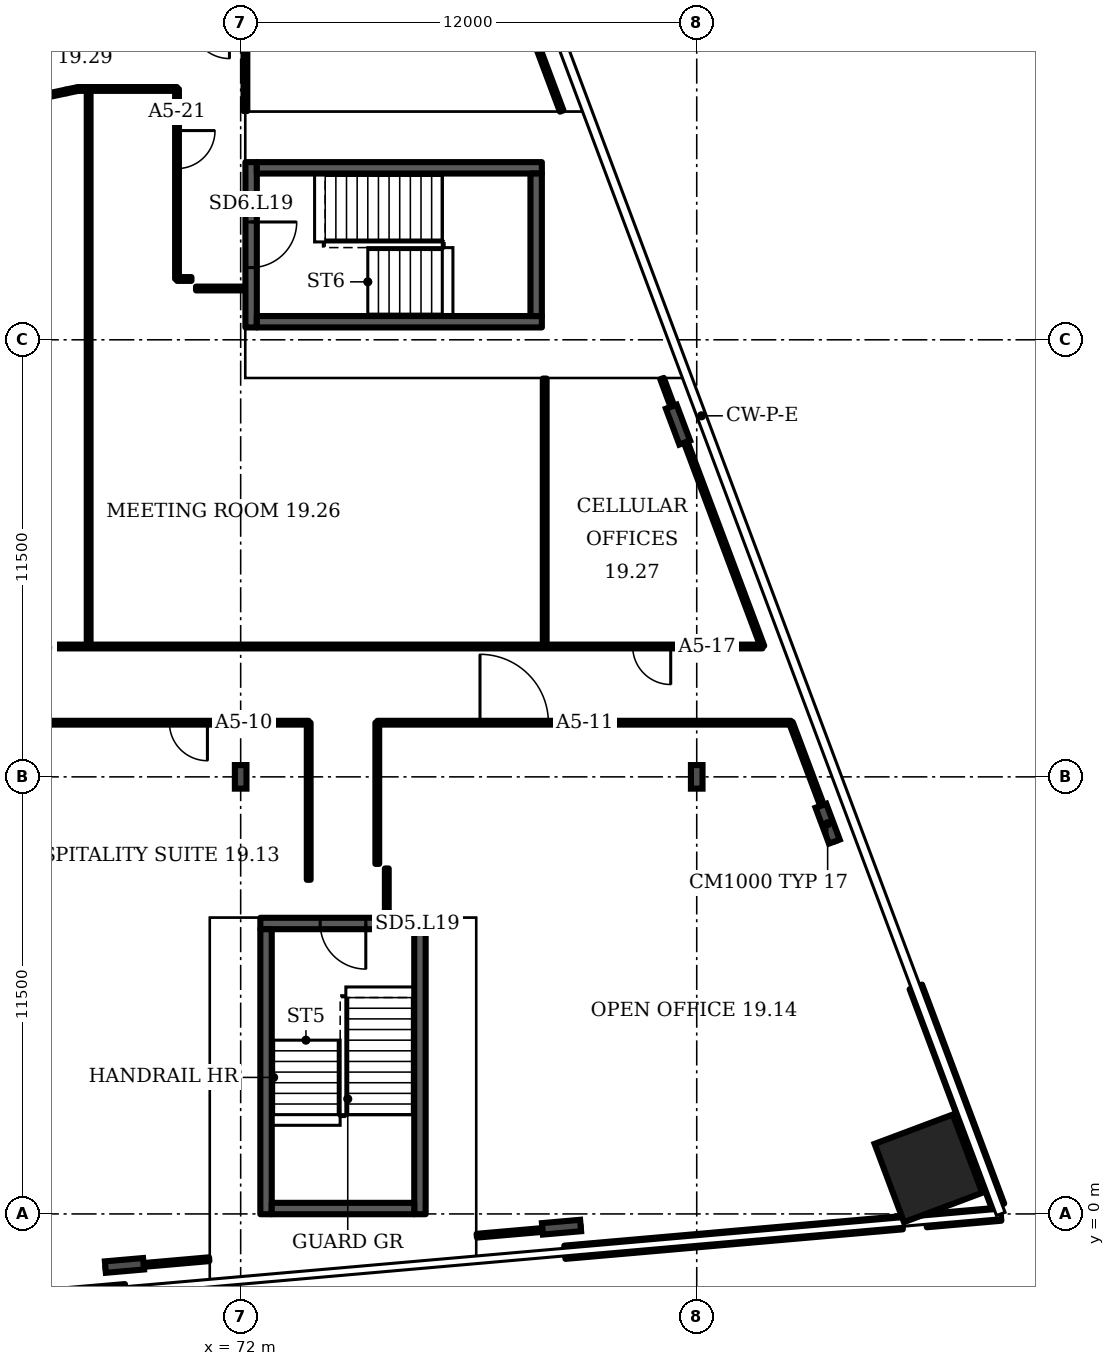
"""IFC4 building model, lengths in metres.
Left out: names, types, materials, properties, quantities, classifications, styles, units other than length and angle.
Written with IfcOpenShell. Run it as: python <this file> out.ifc"""

import sys

from ifc_helpers import new_model, si_unit, direction, frame, frame_2d, origin, origin_2d, place, context, subcontext, project, spatial, rectangle, i_section, extrude, element, fill, save


model = new_model("IFC4")
c1 = context("Model", 3, precision=1e-05, world=origin(), true_north=direction((0.0, 1.0)))
c2 = subcontext(c1, "Body", "Model", "MODEL_VIEW")
j1 = project(units=[si_unit("LENGTHUNIT", "METRE"), si_unit("PLANEANGLEUNIT", "RADIAN")], contexts=[c1])
p1 = place(None, origin())
s1 = spatial("IfcSite", under=j1, at=p1, CompositionType="ELEMENT")
p2 = place(p1, origin())
s2 = spatial("IfcBuilding", under=s1, at=p2, CompositionType="ELEMENT")
p3 = place(p2, frame((0.0, 0.0, 88.3)))
s3 = spatial("IfcBuildingStorey", under=s2, at=p3, CompositionType="ELEMENT", Elevation=88.3)
p4 = place(p3, frame((90.096, 1.2, 0.0), z_axis=(0.0, 0.0, 1.0), x_axis=(-0.351123, 0.936328, 0.0)))
e1 = element("IfcColumn", 1, at=p4, inside=s3, PredefinedType="COLUMN", context=c2, shape_type="SweptSolid", body=[
    extrude(rectangle(XDim=2.2, YDim=2.2, at=origin_2d()), origin(), (0.0, 0.0, 1.0), 3.6),
])
for number, where, z_axis, x_axis in (
    (2, (68.942, -1.355, 0.0), (0.0, 0.0, 1.0), (0.087, -0.996, 0.0)),
    (3, (80.442, -0.349, 0.0), (0.0, 0.0, 1.0), (0.087, -0.996, 0.0)),
    (4, (87.445, 10.268, 0.0), (0.0, 0.0, 1.0), (0.936, 0.351, 0.0)),
    (5, (83.507, 20.768, 0.0), (0.0, 0.0, 1.0), (0.936, 0.351, 0.0)),
):
    element("IfcColumn", number, at=place(p3, frame(where, z_axis=z_axis, x_axis=x_axis)), inside=s3, PredefinedType="COLUMN", context=c2, shape_type="SweptSolid", body=[
        extrude(i_section(OverallWidth=0.302, OverallDepth=1.008, WebThickness=0.021, FlangeThickness=0.04, FilletRadius=0.03, at=origin_2d()), origin(), (0.0, 0.0, 1.0), 3.6),
    ])
for number, where, z_axis, x_axis in (
    (6, (72.0, 11.5, 0.0), (0.0, 0.0, 1.0), (1.0, 0.0, 0.0)),
    (7, (84.0, 11.5, 0.0), (0.0, 0.0, 1.0), (1.0, 0.0, 0.0)),
):
    element("IfcColumn", number, at=place(p3, frame(where, z_axis=z_axis, x_axis=x_axis)), inside=s3, PredefinedType="COLUMN", context=c2, shape_type="SweptSolid", body=[
        extrude(i_section(OverallWidth=0.305, OverallDepth=0.62, WebThickness=0.021, FlangeThickness=0.04, FilletRadius=0.027, at=origin_2d()), origin(), (0.0, 0.0, 1.0), 3.6),
    ])
p5 = place(p3, frame((46.045, -4.026, 0.0), z_axis=(0.0, 0.0, 1.0), x_axis=(0.99619, 0.087163, 0.0)))
e8 = element("IfcWall", 8, at=p5, inside=s3, PredefinedType="SOLIDWALL", context=c2, shape_type="SweptSolid", body=[
    extrude(rectangle(XDim=23.013, YDim=0.35, at=frame_2d((11.506, 0.0))), origin(), (0.0, 0.0, 1.0), 1.0),
])
p6 = place(p3, frame((80.53, -1.009, 0.0), z_axis=(0.0, 0.0, 1.0), x_axis=(0.996198, 0.087169, 0.0)))
e9 = element("IfcWall", 9, at=p6, inside=s3, PredefinedType="SOLIDWALL", context=c2, shape_type="SweptSolid", body=[
    extrude(rectangle(XDim=8.912, YDim=0.35, at=frame_2d((4.456, 0.0))), origin(), (0.0, 0.0, 1.0), 1.0),
])
p7 = place(p3, frame((90.039, -0.177, 0.0), z_axis=(0.0, 0.0, 1.0), x_axis=(0.996193, 0.08717, 0.0)))
e10 = element("IfcWall", 10, at=p7, inside=s3, PredefinedType="SOLIDWALL", context=c2, shape_type="SweptSolid", body=[
    extrude(rectangle(XDim=1.969, YDim=0.35, at=frame_2d((0.984, 0.0))), origin(), (0.0, 0.0, 1.0), 1.0),
])
p8 = place(p3, frame((91.926, 0.211, 0.0), z_axis=(0.0, 0.0, 1.0), x_axis=(-0.351118, 0.936328, 0.0)))
e11 = element("IfcWall", 11, at=p8, inside=s3, PredefinedType="SOLIDWALL", context=c2, shape_type="SweptSolid", body=[
    extrude(rectangle(XDim=6.154, YDim=0.35, at=frame_2d((3.077, 0.0))), origin(), (0.0, 0.0, 1.0), 1.0),
])
p9 = place(p3, frame((72.518, 7.642, 0.0), z_axis=(0.0, 0.0, 1.0), x_axis=(1.0, 0.0, 0.0)))
e12 = element("IfcWall", 12, at=p9, inside=s3, PredefinedType="SHEAR", context=c2, shape_type="SweptSolid", body=[
    extrude(rectangle(XDim=4.35, YDim=0.3, at=frame_2d((2.175, 0.0))), origin(), (0.0, 0.0, 1.0), 3.15),
])
p10 = place(p9, frame((1.575, 0.0, 0.0)))
e13 = element("IfcOpeningElement", 13, at=p10, cuts=e12, PredefinedType="OPENING", context=c2, shape_type="SweptSolid", body=[
    extrude(rectangle(XDim=1.2, YDim=2.1, at=frame_2d((0.6, 1.05))), frame((0.0, 0.16, 0.0), z_axis=(0.0, -1.0, 0.0), x_axis=(1.0, 0.0, 0.0)), (0.0, 0.0, 1.0), 0.32),
])
p11 = place(p3, frame((72.275, 23.325, 0.0), z_axis=(0.0, 0.0, 1.0), x_axis=(0.0, 1.0, 0.0)))
e14 = element("IfcWall", 14, at=p11, inside=s3, PredefinedType="SHEAR", context=c2, shape_type="SweptSolid", body=[
    extrude(rectangle(XDim=4.35, YDim=0.3, at=frame_2d((2.175, 0.0))), origin(), (0.0, 0.0, 1.0), 3.15),
])
p12 = place(p11, frame((1.575, 0.0, 0.0)))
e15 = element("IfcOpeningElement", 15, at=p12, cuts=e14, PredefinedType="OPENING", context=c2, shape_type="SweptSolid", body=[
    extrude(rectangle(XDim=1.2, YDim=2.1, at=frame_2d((0.6, 1.05))), frame((0.0, 0.16, 0.0), z_axis=(0.0, -1.0, 0.0), x_axis=(1.0, 0.0, 0.0)), (0.0, 0.0, 1.0), 0.32),
])
p13 = place(p3, frame((45.3, 12.925, 0.0), z_axis=(0.0, 0.0, 1.0), x_axis=(1.0, 0.0, 0.0)))
e16 = element("IfcWall", 16, at=p13, inside=s3, PredefinedType="PARTITIONING", context=c2, shape_type="SweptSolid", body=[
    extrude(rectangle(XDim=28.49, YDim=0.1, at=frame_2d((14.245, 0.0))), origin(), (0.0, 0.0, 1.0), 3.15),
])
p14 = place(p13, frame((5.525, 0.0, 0.0)))
e17 = element("IfcOpeningElement", 17, at=p14, cuts=e16, PredefinedType="OPENING", context=c2, shape_type="SweptSolid", body=[
    extrude(rectangle(XDim=1.8, YDim=2.1, at=frame_2d((0.9, 1.05))), frame((0.0, 0.06, 0.0), z_axis=(0.0, -1.0, 0.0), x_axis=(1.0, 0.0, 0.0)), (0.0, 0.0, 1.0), 0.12),
])
p15 = place(p13, frame((12.825, 0.0, 0.0)))
e18 = element("IfcOpeningElement", 18, at=p15, cuts=e16, PredefinedType="OPENING", context=c2, shape_type="SweptSolid", body=[
    extrude(rectangle(XDim=1.0, YDim=2.1, at=frame_2d((0.5, 1.05))), frame((0.0, 0.06, 0.0), z_axis=(0.0, -1.0, 0.0), x_axis=(1.0, 0.0, 0.0)), (0.0, 0.0, 1.0), 0.12),
])
p16 = place(p13, frame((17.625, 0.0, 0.0)))
e19 = element("IfcOpeningElement", 19, at=p16, cuts=e16, PredefinedType="OPENING", context=c2, shape_type="SweptSolid", body=[
    extrude(rectangle(XDim=1.0, YDim=2.1, at=frame_2d((0.5, 1.05))), frame((0.0, 0.06, 0.0), z_axis=(0.0, -1.0, 0.0), x_axis=(1.0, 0.0, 0.0)), (0.0, 0.0, 1.0), 0.12),
])
p17 = place(p13, frame((24.825, 0.0, 0.0)))
e20 = element("IfcOpeningElement", 20, at=p17, cuts=e16, PredefinedType="OPENING", context=c2, shape_type="SweptSolid", body=[
    extrude(rectangle(XDim=1.0, YDim=2.1, at=frame_2d((0.5, 1.05))), frame((0.0, 0.06, 0.0), z_axis=(0.0, -1.0, 0.0), x_axis=(1.0, 0.0, 0.0)), (0.0, 0.0, 1.0), 0.12),
])
p18 = place(p3, frame((45.3, 14.93, 0.0), z_axis=(0.0, 0.0, 1.0), x_axis=(1.0, 0.0, 0.0)))
e21 = element("IfcWall", 21, at=p18, inside=s3, PredefinedType="PARTITIONING", context=c2, shape_type="SweptSolid", body=[
    extrude(rectangle(XDim=40.43, YDim=0.1, at=frame_2d((20.215, 0.0))), origin(), (0.0, 0.0, 1.0), 3.15),
])
p19 = place(p18, frame((12.665, 0.0, 0.0)))
e22 = element("IfcOpeningElement", 22, at=p19, cuts=e21, PredefinedType="OPENING", context=c2, shape_type="SweptSolid", body=[
    extrude(rectangle(XDim=1.0, YDim=2.1, at=frame_2d((0.5, 1.05))), frame((0.0, 0.06, 0.0), z_axis=(0.0, -1.0, 0.0), x_axis=(1.0, 0.0, 0.0)), (0.0, 0.0, 1.0), 0.12),
])
p20 = place(p18, frame((19.08, 0.0, 0.0)))
e23 = element("IfcOpeningElement", 23, at=p20, cuts=e21, PredefinedType="OPENING", context=c2, shape_type="SweptSolid", body=[
    extrude(rectangle(XDim=1.0, YDim=2.1, at=frame_2d((0.5, 1.05))), frame((0.0, 0.06, 0.0), z_axis=(0.0, -1.0, 0.0), x_axis=(1.0, 0.0, 0.0)), (0.0, 0.0, 1.0), 0.12),
])
p21 = place(p18, frame((37.015, 0.0, 0.0)))
e24 = element("IfcOpeningElement", 24, at=p21, cuts=e21, PredefinedType="OPENING", context=c2, shape_type="SweptSolid", body=[
    extrude(rectangle(XDim=1.0, YDim=2.1, at=frame_2d((0.5, 1.05))), frame((0.0, 0.06, 0.0), z_axis=(0.0, -1.0, 0.0), x_axis=(1.0, 0.0, 0.0)), (0.0, 0.0, 1.0), 0.12),
])
p22 = place(p3, frame((66.78, 29.4, 0.0), z_axis=(0.0, 0.0, 1.0), x_axis=(0.977792, 0.209581, 0.0)))
e25 = element("IfcWall", 25, at=p22, inside=s3, PredefinedType="PARTITIONING", context=c2, shape_type="SweptSolid", body=[
    extrude(rectangle(XDim=0.644, YDim=0.1, at=frame_2d((0.322, 0.0))), origin(), (0.0, 0.0, 1.0), 3.15),
])
p23 = place(p3, frame((67.41, 29.535, 0.0), z_axis=(0.0, 0.0, 1.0), x_axis=(0.978604, 0.205738, 0.0)))
e26 = element("IfcWall", 26, at=p23, inside=s3, PredefinedType="PARTITIONING", context=c2, shape_type="SweptSolid", body=[
    extrude(rectangle(XDim=0.317, YDim=0.1, at=frame_2d((0.158, 0.0))), origin(), (0.0, 0.0, 1.0), 3.15),
])
p24 = place(p3, frame((67.72, 29.6, 0.0), z_axis=(0.0, 0.0, 1.0), x_axis=(1.0, 0.0, 0.0)))
e27 = element("IfcWall", 27, at=p24, inside=s3, PredefinedType="PARTITIONING", context=c2, shape_type="SweptSolid", body=[
    extrude(rectangle(XDim=2.605, YDim=0.1, at=frame_2d((1.302, 0.0))), origin(), (0.0, 0.0, 1.0), 3.15),
])
p25 = place(p3, frame((68.0, 14.93, 0.0), z_axis=(0.0, 0.0, 1.0), x_axis=(0.0, 1.0, 0.0)))
e28 = element("IfcWall", 28, at=p25, inside=s3, PredefinedType="PARTITIONING", context=c2, shape_type="SweptSolid", body=[
    extrude(rectangle(XDim=14.67, YDim=0.1, at=frame_2d((7.335, 0.0))), origin(), (0.0, 0.0, 1.0), 3.15),
])
p26 = place(p3, frame((68.445, -1.43, 0.0), z_axis=(0.0, 0.0, 1.0), x_axis=(0.996195, 0.087118, 0.0)))
e29 = element("IfcWall", 29, at=p26, inside=s3, PredefinedType="PARTITIONING", context=c2, shape_type="SweptSolid", body=[
    extrude(rectangle(XDim=2.738, YDim=0.1, at=frame_2d((1.369, 0.0))), origin(), (0.0, 0.0, 1.0), 2.53),
])
p27 = place(p3, frame((70.325, 24.6, 0.0), z_axis=(0.0, 0.0, 1.0), x_axis=(0.0, 1.0, 0.0)))
e30 = element("IfcWall", 30, at=p27, inside=s3, PredefinedType="PARTITIONING", context=c2, shape_type="SweptSolid", body=[
    extrude(rectangle(XDim=5.0, YDim=0.1, at=frame_2d((2.5, 0.0))), origin(), (0.0, 0.0, 1.0), 3.15),
])
p28 = place(p27, frame((2.905, 0.0, 0.0)))
e31 = element("IfcOpeningElement", 31, at=p28, cuts=e30, PredefinedType="OPENING", context=c2, shape_type="SweptSolid", body=[
    extrude(rectangle(XDim=1.0, YDim=2.1, at=frame_2d((0.5, 1.05))), frame((0.0, 0.06, 0.0), z_axis=(0.0, -1.0, 0.0), x_axis=(1.0, 0.0, 0.0)), (0.0, 0.0, 1.0), 0.12),
])
p29 = place(p3, frame((70.325, 24.6, 0.0), z_axis=(0.0, 0.0, 1.0), x_axis=(1.0, 0.0, 0.0)))
e32 = element("IfcWall", 32, at=p29, inside=s3, PredefinedType="PARTITIONING", context=c2, shape_type="SweptSolid", body=[
    extrude(rectangle(XDim=0.38, YDim=0.1, at=frame_2d((0.19, 0.0))), origin(), (0.0, 0.0, 1.0), 3.15),
])
p30 = place(p3, frame((70.825, 24.35, 0.0), z_axis=(0.0, 0.0, 1.0), x_axis=(1.0, 0.0, 0.0)))
e33 = element("IfcWall", 33, at=p30, inside=s3, PredefinedType="PARTITIONING", context=c2, shape_type="SweptSolid", body=[
    extrude(rectangle(XDim=1.28, YDim=0.1, at=frame_2d((0.64, 0.0))), origin(), (0.0, 0.0, 1.0), 3.15),
])
p31 = place(p3, frame((72.125, 29.02, 0.0), z_axis=(0.0, 0.0, 1.0), x_axis=(0.0, 1.0, 0.0)))
e34 = element("IfcWall", 34, at=p31, inside=s3, PredefinedType="PARTITIONING", context=c2, shape_type="SweptSolid", body=[
    extrude(rectangle(XDim=2.38, YDim=0.1, at=frame_2d((1.19, 0.0))), origin(), (0.0, 0.0, 1.0), 3.15),
])
p32 = place(p3, frame((73.79, 8.792, 0.0), z_axis=(0.0, 0.0, 1.0), x_axis=(0.0, 1.0, 0.0)))
e35 = element("IfcWall", 35, at=p32, inside=s3, PredefinedType="PARTITIONING", context=c2, shape_type="SweptSolid", body=[
    extrude(rectangle(XDim=4.133, YDim=0.1, at=frame_2d((2.066, 0.0))), origin(), (0.0, 0.0, 1.0), 3.15),
])
p33 = place(p3, frame((75.595, 9.21, 0.0), z_axis=(0.0, 0.0, 1.0), x_axis=(0.0, 1.0, 0.0)))
e36 = element("IfcWall", 36, at=p33, inside=s3, PredefinedType="PARTITIONING", context=c2, shape_type="SweptSolid", body=[
    extrude(rectangle(XDim=3.715, YDim=0.1, at=frame_2d((1.857, 0.0))), origin(), (0.0, 0.0, 1.0), 3.15),
])
p34 = place(p3, frame((75.595, 12.925, 0.0), z_axis=(0.0, 0.0, 1.0), x_axis=(1.0, 0.0, 0.0)))
e37 = element("IfcWall", 37, at=p34, inside=s3, PredefinedType="PARTITIONING", context=c2, shape_type="SweptSolid", body=[
    extrude(rectangle(XDim=10.885, YDim=0.1, at=frame_2d((5.442, 0.0))), origin(), (0.0, 0.0, 1.0), 3.15),
])
p35 = place(p34, frame((2.702, 0.0, 0.0)))
e38 = element("IfcOpeningElement", 38, at=p35, cuts=e37, PredefinedType="OPENING", context=c2, shape_type="SweptSolid", body=[
    extrude(rectangle(XDim=1.8, YDim=2.1, at=frame_2d((0.9, 1.05))), frame((0.0, 0.06, 0.0), z_axis=(0.0, -1.0, 0.0), x_axis=(1.0, 0.0, 0.0)), (0.0, 0.0, 1.0), 0.12),
])
p36 = place(p3, frame((75.845, 7.812, 0.0), z_axis=(0.0, 0.0, 1.0), x_axis=(0.0, 1.0, 0.0)))
e39 = element("IfcWall", 39, at=p36, inside=s3, PredefinedType="PARTITIONING", context=c2, shape_type="SweptSolid", body=[
    extrude(rectangle(XDim=1.278, YDim=0.1, at=frame_2d((0.639, 0.0))), origin(), (0.0, 0.0, 1.0), 3.15),
])
p37 = place(p3, frame((78.212, -0.573, 0.0), z_axis=(0.0, 0.0, 1.0), x_axis=(0.996224, 0.086779, 0.0)))
e40 = element("IfcWall", 40, at=p37, inside=s3, PredefinedType="PARTITIONING", context=c2, shape_type="SweptSolid", body=[
    extrude(rectangle(XDim=2.743, YDim=0.1, at=frame_2d((1.372, 0.0))), origin(), (0.0, 0.0, 1.0), 2.53),
])
p38 = place(p3, frame((80.0, 14.93, 0.0), z_axis=(0.0, 0.0, 1.0), x_axis=(0.0, 1.0, 0.0)))
e41 = element("IfcWall", 41, at=p38, inside=s3, PredefinedType="PARTITIONING", context=c2, shape_type="SweptSolid", body=[
    extrude(rectangle(XDim=7.05, YDim=0.1, at=frame_2d((3.525, 0.0))), origin(), (0.0, 0.0, 1.0), 3.15),
])
p39 = place(p3, frame((80.446, 29.02, 0.0), z_axis=(0.0, 0.0, 1.0), x_axis=(-0.350707, 0.936481, 0.0)))
e42 = element("IfcWall", 42, at=p39, inside=s3, PredefinedType="PARTITIONING", context=c2, shape_type="SweptSolid", body=[
    extrude(rectangle(XDim=2.901, YDim=0.1, at=frame_2d((1.45, 0.0))), origin(), (0.0, 0.0, 1.0), 2.53),
])
p40 = place(p3, frame((83.71, 20.31, 0.0), z_axis=(0.0, 0.0, 1.0), x_axis=(-0.349322, 0.937005, 0.0)))
e43 = element("IfcWall", 43, at=p40, inside=s3, PredefinedType="PARTITIONING", context=c2, shape_type="SweptSolid", body=[
    extrude(rectangle(XDim=1.782, YDim=0.1, at=frame_2d((0.891, 0.0))), origin(), (0.0, 0.0, 1.0), 2.53),
])
p41 = place(p3, frame((85.73, 14.93, 0.0), z_axis=(0.0, 0.0, 1.0), x_axis=(-0.351501, 0.936189, 0.0)))
e44 = element("IfcWall", 44, at=p41, inside=s3, PredefinedType="PARTITIONING", context=c2, shape_type="SweptSolid", body=[
    extrude(rectangle(XDim=5.747, YDim=0.1, at=frame_2d((2.874, 0.0))), origin(), (0.0, 0.0, 1.0), 2.53),
])
p42 = place(p3, frame((87.65, 9.81, 0.0), z_axis=(0.0, 0.0, 1.0), x_axis=(-0.351597, 0.936149, 0.0)))
e45 = element("IfcWall", 45, at=p42, inside=s3, PredefinedType="PARTITIONING", context=c2, shape_type="SweptSolid", body=[
    extrude(rectangle(XDim=3.327, YDim=0.1, at=frame_2d((1.664, 0.0))), origin(), (0.0, 0.0, 1.0), 2.53),
])
for number, where, z_axis, x_axis in (
    (46, (72.667, -0.008, 0.0), (0.0, 0.0, 1.0), (0.0, 1.0, 0.0)),
    (47, (76.718, -0.008, 0.0), (0.0, 0.0, 1.0), (0.0, 1.0, 0.0)),
):
    element("IfcWall", number, at=place(p3, frame(where, z_axis=z_axis, x_axis=x_axis)), inside=s3, PredefinedType="SHEAR", context=c2, shape_type="SweptSolid", body=[
        extrude(rectangle(XDim=7.5, YDim=0.3, at=frame_2d((3.75, 0.0))), origin(), (0.0, 0.0, 1.0), 3.15),
    ])
p43 = place(p3, frame((72.817, 0.142, 0.0), z_axis=(0.0, 0.0, 1.0), x_axis=(1.0, 0.0, 0.0)))
e48 = element("IfcWall", 48, at=p43, inside=s3, PredefinedType="SHEAR", context=c2, shape_type="SweptSolid", body=[
    extrude(rectangle(XDim=3.75, YDim=0.3, at=frame_2d((1.875, 0.0))), origin(), (0.0, 0.0, 1.0), 3.15),
])
for number, where, z_axis, x_axis in (
    (49, (72.425, 23.475, 0.0), (0.0, 0.0, 1.0), (1.0, 0.0, 0.0)),
    (50, (72.425, 27.525, 0.0), (0.0, 0.0, 1.0), (1.0, 0.0, 0.0)),
):
    element("IfcWall", number, at=place(p3, frame(where, z_axis=z_axis, x_axis=x_axis)), inside=s3, PredefinedType="SHEAR", context=c2, shape_type="SweptSolid", body=[
        extrude(rectangle(XDim=7.5, YDim=0.3, at=frame_2d((3.75, 0.0))), origin(), (0.0, 0.0, 1.0), 3.15),
    ])
p44 = place(p3, frame((79.775, 23.625, 0.0), z_axis=(0.0, 0.0, 1.0), x_axis=(0.0, 1.0, 0.0)))
e51 = element("IfcWall", 51, at=p44, inside=s3, PredefinedType="SHEAR", context=c2, shape_type="SweptSolid", body=[
    extrude(rectangle(XDim=3.75, YDim=0.3, at=frame_2d((1.875, 0.0))), origin(), (0.0, 0.0, 1.0), 3.15),
])
p45 = place(p10, origin())
e52 = element("IfcDoor", 52, at=p45, inside=s3, OperationType="SINGLE_SWING_RIGHT", PredefinedType="DOOR", context=c2, shape_type="SweptSolid", body=[
    extrude(rectangle(XDim=1.2, YDim=2.1, at=frame_2d((0.6, 1.05))), frame((0.0, 0.025, 0.0), z_axis=(0.0, -1.0, 0.0), x_axis=(1.0, 0.0, 0.0)), (0.0, 0.0, 1.0), 0.05),
])
fill(e13, e52)
p46 = place(p12, origin())
e53 = element("IfcDoor", 53, at=p46, inside=s3, OperationType="SINGLE_SWING_RIGHT", PredefinedType="DOOR", context=c2, shape_type="SweptSolid", body=[
    extrude(rectangle(XDim=1.2, YDim=2.1, at=frame_2d((0.6, 1.05))), frame((0.0, 0.025, 0.0), z_axis=(0.0, -1.0, 0.0), x_axis=(1.0, 0.0, 0.0)), (0.0, 0.0, 1.0), 0.05),
])
fill(e15, e53)
p47 = place(p17, origin())
e54 = element("IfcDoor", 54, at=p47, inside=s3, OperationType="SINGLE_SWING_RIGHT", PredefinedType="DOOR", context=c2, shape_type="SweptSolid", body=[
    extrude(rectangle(XDim=1.0, YDim=2.1, at=frame_2d((0.5, 1.05))), frame((0.0, 0.025, 0.0), z_axis=(0.0, -1.0, 0.0), x_axis=(1.0, 0.0, 0.0)), (0.0, 0.0, 1.0), 0.05),
])
fill(e20, e54)
p48 = place(p35, origin())
e55 = element("IfcDoor", 55, at=p48, inside=s3, OperationType="DOUBLE_DOOR_SINGLE_SWING", PredefinedType="DOOR", context=c2, shape_type="SweptSolid", body=[
    extrude(rectangle(XDim=1.8, YDim=2.1, at=frame_2d((0.9, 1.05))), frame((0.0, 0.025, 0.0), z_axis=(0.0, -1.0, 0.0), x_axis=(1.0, 0.0, 0.0)), (0.0, 0.0, 1.0), 0.05),
])
fill(e38, e55)
p49 = place(p21, origin())
e56 = element("IfcDoor", 56, at=p49, inside=s3, OperationType="SINGLE_SWING_RIGHT", PredefinedType="DOOR", context=c2, shape_type="SweptSolid", body=[
    extrude(rectangle(XDim=1.0, YDim=2.1, at=frame_2d((0.5, 1.05))), frame((0.0, 0.025, 0.0), z_axis=(0.0, -1.0, 0.0), x_axis=(1.0, 0.0, 0.0)), (0.0, 0.0, 1.0), 0.05),
])
fill(e24, e56)
p50 = place(p28, origin())
e57 = element("IfcDoor", 57, at=p50, inside=s3, OperationType="SINGLE_SWING_RIGHT", PredefinedType="DOOR", context=c2, shape_type="SweptSolid", body=[
    extrude(rectangle(XDim=1.0, YDim=2.1, at=frame_2d((0.5, 1.05))), frame((0.0, 0.025, 0.0), z_axis=(0.0, -1.0, 0.0), x_axis=(1.0, 0.0, 0.0)), (0.0, 0.0, 1.0), 0.05),
])
fill(e31, e57)
save(model, sys.argv[1])
